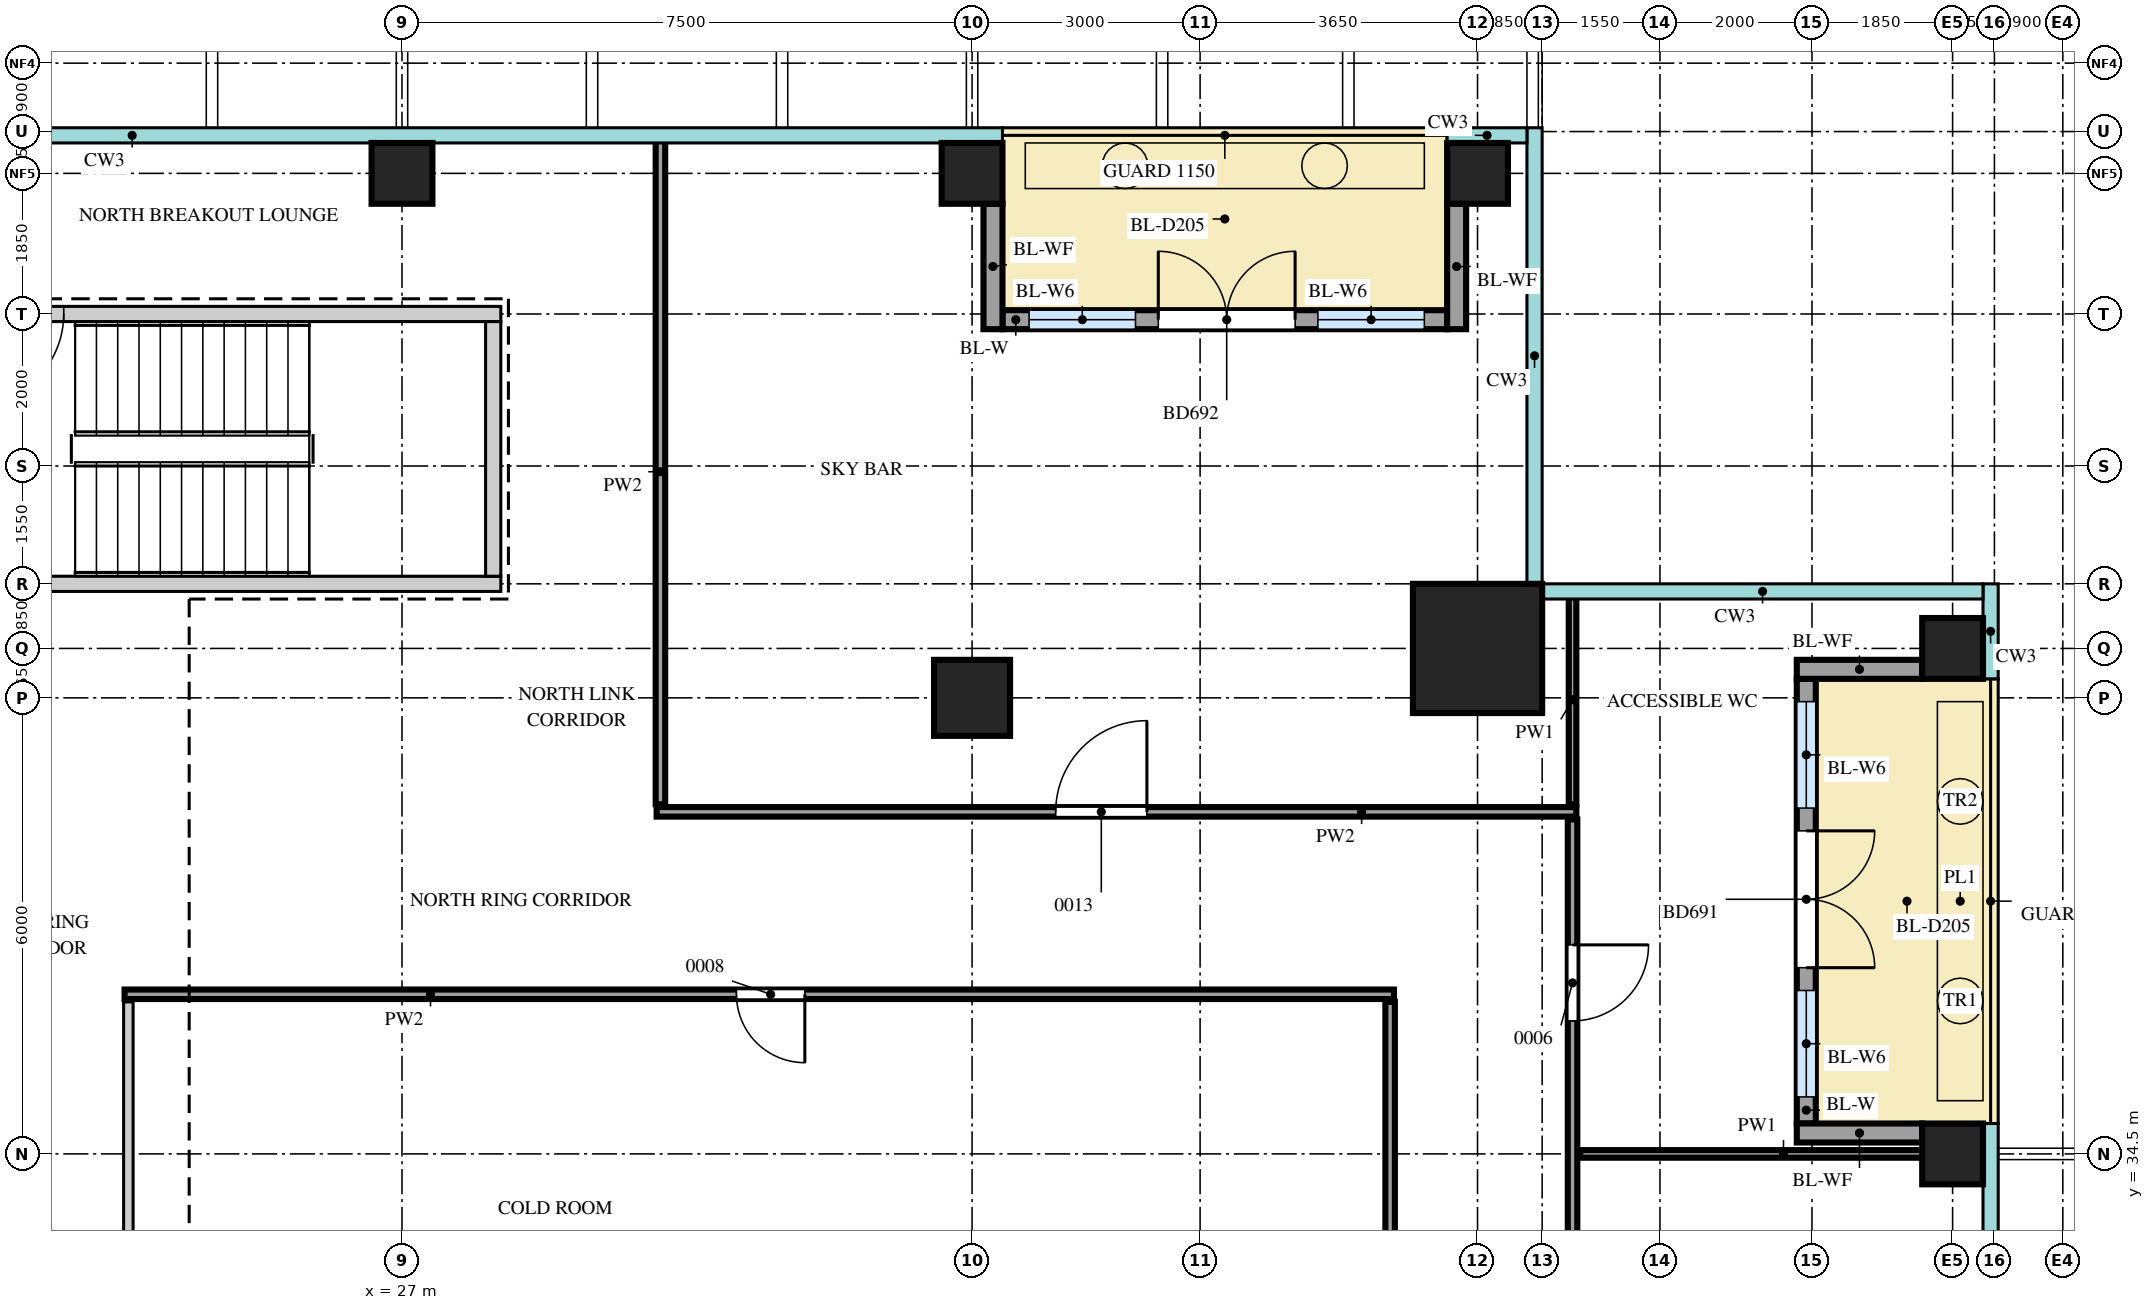
"""IFC4 building model, lengths in metres.
Left out: names, types, materials, properties, quantities, classifications, styles, units other than length and angle.
Written with IfcOpenShell. Run it as: python <this file> out.ifc"""

import sys

from ifc_helpers import new_model, si_unit, direction, frame, frame_2d, origin, origin_2d, place, context, subcontext, project, spatial, rectangle, extrude, source, transform, mapped, element, fill, save


model = new_model("IFC4")
c1 = context("Model", 3, precision=1e-05, world=origin(), true_north=direction((0.0, 1.0)))
c2 = subcontext(c1, "Body", "Model", "MODEL_VIEW")
j1 = project(units=[si_unit("LENGTHUNIT", "METRE"), si_unit("PLANEANGLEUNIT", "RADIAN")], contexts=[c1])
p1 = place(None, origin())
s1 = spatial("IfcSite", under=j1, at=p1, CompositionType="ELEMENT")
p2 = place(p1, origin())
s2 = spatial("IfcBuilding", under=s1, at=p2, CompositionType="ELEMENT")
p3 = place(p2, frame((0.0, 0.0, 306.2)))
s3 = spatial("IfcBuildingStorey", under=s2, at=p3, CompositionType="ELEMENT", Elevation=306.2)
m1 = source(origin(), c2, "Body", "SweptSolid", [
    extrude(rectangle(XDim=7.1, YDim=0.2, at=frame_2d((3.55, 0.0))), origin(), (0.0, 0.0, 1.0), 3.75),
])
p4 = place(p3, frame((21.2, 45.55, 0.0), z_axis=(0.0, 0.0, 1.0), x_axis=(1.0, 0.0, 0.0)))
e1 = element("IfcWall", 1, at=p4, inside=s3, PredefinedType="SHEAR", context=c2, shape_type="MappedRepresentation", body=[
    mapped(m1, transform((0.0, 0.0, 0.0))),
])
m2 = source(origin(), c2, "Body", "SweptSolid", [
    extrude(rectangle(XDim=1.2, YDim=2.1, at=frame_2d((0.6, 1.05))), frame((0.0, 0.11, 0.0), z_axis=(0.0, -1.0, 0.0), x_axis=(1.0, 0.0, 0.0)), (0.0, 0.0, 1.0), 0.22),
])
p5 = place(p4, frame((0.15, 0.0, 0.0)))
e2 = element("IfcOpeningElement", 2, at=p5, cuts=e1, PredefinedType="OPENING", context=c2, shape_type="MappedRepresentation", body=[
    mapped(m2, transform((0.0, 0.0, 0.0))),
])
p6 = place(p3, frame((21.2, 42.0, 0.0), z_axis=(0.0, 0.0, 1.0), x_axis=(1.0, 0.0, 0.0)))
e3 = element("IfcWall", 3, at=p6, inside=s3, PredefinedType="SHEAR", context=c2, shape_type="MappedRepresentation", body=[
    mapped(m1, transform((0.0, 0.0, 0.0))),
])
m3 = source(origin(), c2, "Body", "SweptSolid", [
    extrude(rectangle(XDim=3.35, YDim=0.2, at=frame_2d((1.675, 0.0))), origin(), (0.0, 0.0, 1.0), 3.75),
])
p7 = place(p3, frame((28.2, 42.1, 0.0), z_axis=(0.0, 0.0, 1.0), x_axis=(0.0, 1.0, 0.0)))
e4 = element("IfcWall", 4, at=p7, inside=s3, PredefinedType="SHEAR", context=c2, shape_type="MappedRepresentation", body=[
    mapped(m3, transform((0.0, 0.0, 0.0))),
])
m4 = source(origin(), c2, "Body", "SweptSolid", [
    extrude(rectangle(XDim=1.7, YDim=1.7, at=origin_2d()), origin(), (0.0, 0.0, 1.0), 3.75),
])
p8 = place(p3, frame((41.15, 41.15, 0.0), z_axis=(0.0, 0.0, 1.0), x_axis=(1.0, 0.0, 0.0)))
e5 = element("IfcColumn", 5, at=p8, inside=s3, PredefinedType="COLUMN", context=c2, shape_type="MappedRepresentation", body=[
    mapped(m4, transform((0.0, 0.0, 0.0))),
])
m5 = source(origin(), c2, "Body", "SweptSolid", [
    extrude(rectangle(XDim=0.8, YDim=0.8, at=origin_2d()), origin(), (0.0, 0.0, 1.0), 3.75),
])
for number, where, z_axis, x_axis in (
    (6, (47.4, 34.5, 0.0), (0.0, 0.0, 1.0), (1.0, 0.0, 0.0)),
    (7, (47.4, 41.15, 0.0), (0.0, 0.0, 1.0), (1.0, 0.0, 0.0)),
    (8, (27.0, 47.4, 0.0), (0.0, 0.0, 1.0), (1.0, 0.0, 0.0)),
    (9, (34.5, 47.4, 0.0), (0.0, 0.0, 1.0), (1.0, 0.0, 0.0)),
    (10, (41.15, 47.4, 0.0), (0.0, 0.0, 1.0), (1.0, 0.0, 0.0)),
):
    element("IfcColumn", number, at=place(p3, frame(where, z_axis=z_axis, x_axis=x_axis)), inside=s3, PredefinedType="COLUMN", context=c2, shape_type="MappedRepresentation", body=[
        mapped(m5, transform((0.0, 0.0, 0.0))),
    ])
m6 = source(origin(), c2, "Body", "SweptSolid", [
    extrude(rectangle(XDim=1.0, YDim=1.0, at=origin_2d()), origin(), (0.0, 0.0, 1.0), 3.75),
])
p9 = place(p3, frame((34.5, 40.5, 0.0), z_axis=(0.0, 0.0, 1.0), x_axis=(1.0, 0.0, 0.0)))
e11 = element("IfcColumn", 11, at=p9, inside=s3, PredefinedType="COLUMN", context=c2, shape_type="MappedRepresentation", body=[
    mapped(m6, transform((0.0, 0.0, 0.0))),
])
m7 = source(origin(), c2, "Body", "SweptSolid", [
    extrude(rectangle(XDim=5.85, YDim=0.25, at=frame_2d((2.925, 0.0))), origin(), (0.0, 0.0, 1.0), 3.75),
])
p10 = place(p3, frame((45.475, 34.9, 0.0), z_axis=(0.0, 0.0, 1.0), x_axis=(0.0, 1.0, 0.0)))
e12 = element("IfcWall", 12, at=p10, inside=s3, PredefinedType="SOLIDWALL", context=c2, shape_type="MappedRepresentation", body=[
    mapped(m7, transform((0.0, 0.0, 0.0))),
])
m8 = source(origin(), c2, "Body", "SweptSolid", [
    extrude(rectangle(XDim=1.4, YDim=2.4, at=frame_2d((0.7, 1.2))), frame((0.0, 0.135, 0.0), z_axis=(0.0, -1.0, 0.0), x_axis=(1.0, 0.0, 0.0)), (0.0, 0.0, 1.0), 0.27),
])
p11 = place(p10, frame((0.35, 0.0, 0.0)))
e13 = element("IfcOpeningElement", 13, at=p11, cuts=e12, PredefinedType="OPENING", context=c2, shape_type="MappedRepresentation", body=[
    mapped(m8, transform((0.0, 0.0, 0.0))),
])
p12 = place(p10, frame((4.15, 0.0, 0.0)))
e14 = element("IfcOpeningElement", 14, at=p12, cuts=e12, PredefinedType="OPENING", context=c2, shape_type="MappedRepresentation", body=[
    mapped(m8, transform((0.0, 0.0, 0.0))),
])
m9 = source(origin(), c2, "Body", "SweptSolid", [
    extrude(rectangle(XDim=1.8, YDim=2.4, at=frame_2d((0.9, 1.2))), frame((0.0, 0.135, 0.0), z_axis=(0.0, -1.0, 0.0), x_axis=(1.0, 0.0, 0.0)), (0.0, 0.0, 1.0), 0.27),
])
p13 = place(p10, frame((2.05, 0.0, 0.0)))
e15 = element("IfcOpeningElement", 15, at=p13, cuts=e12, PredefinedType="OPENING", context=c2, shape_type="MappedRepresentation", body=[
    mapped(m9, transform((0.0, 0.0, 0.0))),
])
m10 = source(origin(), c2, "Body", "SweptSolid", [
    extrude(rectangle(XDim=1.65, YDim=0.25, at=frame_2d((0.825, 0.0))), origin(), (0.0, 0.0, 1.0), 3.45),
])
for number, where, z_axis, x_axis in (
    (16, (47.0, 34.775, 0.0), (0.0, 0.0, 1.0), (-1.0, 0.0, 0.0)),
    (17, (47.0, 40.875, 0.0), (0.0, 0.0, 1.0), (-1.0, 0.0, 0.0)),
):
    element("IfcWall", number, at=place(p3, frame(where, z_axis=z_axis, x_axis=x_axis)), inside=s3, PredefinedType="SOLIDWALL", context=c2, shape_type="MappedRepresentation", body=[
        mapped(m10, transform((0.0, 0.0, 0.0))),
    ])
p14 = place(p3, frame((34.9, 45.475, 0.0), z_axis=(0.0, 0.0, 1.0), x_axis=(1.0, 0.0, 0.0)))
e18 = element("IfcWall", 18, at=p14, inside=s3, PredefinedType="SOLIDWALL", context=c2, shape_type="MappedRepresentation", body=[
    mapped(m7, transform((0.0, 0.0, 0.0))),
])
p15 = place(p14, frame((0.35, 0.0, 0.0)))
e19 = element("IfcOpeningElement", 19, at=p15, cuts=e18, PredefinedType="OPENING", context=c2, shape_type="MappedRepresentation", body=[
    mapped(m8, transform((0.0, 0.0, 0.0))),
])
p16 = place(p14, frame((4.15, 0.0, 0.0)))
e20 = element("IfcOpeningElement", 20, at=p16, cuts=e18, PredefinedType="OPENING", context=c2, shape_type="MappedRepresentation", body=[
    mapped(m8, transform((0.0, 0.0, 0.0))),
])
p17 = place(p14, frame((2.05, 0.0, 0.0)))
e21 = element("IfcOpeningElement", 21, at=p17, cuts=e18, PredefinedType="OPENING", context=c2, shape_type="MappedRepresentation", body=[
    mapped(m9, transform((0.0, 0.0, 0.0))),
])
for number, where, z_axis, x_axis in (
    (22, (34.775, 47.0, 0.0), (0.0, 0.0, 1.0), (0.0, -1.0, 0.0)),
    (23, (40.875, 47.0, 0.0), (0.0, 0.0, 1.0), (0.0, -1.0, 0.0)),
):
    element("IfcWall", number, at=place(p3, frame(where, z_axis=z_axis, x_axis=x_axis)), inside=s3, PredefinedType="SOLIDWALL", context=c2, shape_type="MappedRepresentation", body=[
        mapped(m10, transform((0.0, 0.0, 0.0))),
    ])
m11 = source(origin(), c2, "Body", "SweptSolid", [
    extrude(rectangle(XDim=23.8, YDim=0.125, at=frame_2d((11.9, 0.0))), origin(), (0.0, 0.0, 1.0), 3.8),
])
p18 = place(p3, frame((42.4, 15.1, 0.0), z_axis=(0.0, 0.0, 1.0), x_axis=(0.0, 1.0, 0.0)))
e24 = element("IfcWall", 24, at=p18, inside=s3, PredefinedType="PARTITIONING", context=c2, shape_type="MappedRepresentation", body=[
    mapped(m11, transform((0.0, 0.0, 0.0))),
])
m12 = source(origin(), c2, "Body", "SweptSolid", [
    extrude(rectangle(XDim=1.2, YDim=2.1, at=frame_2d((0.6, 1.05))), frame((0.0, 0.073, 0.0), z_axis=(0.0, -1.0, 0.0), x_axis=(1.0, 0.0, 0.0)), (0.0, 0.0, 1.0), 0.145),
])
p19 = place(p18, frame((1.55, 0.0, 0.0)))
e25 = element("IfcOpeningElement", 25, at=p19, cuts=e24, PredefinedType="OPENING", context=c2, shape_type="MappedRepresentation", body=[
    mapped(m12, transform((0.0, 0.0, 0.0))),
])
p20 = place(p18, frame((7.55, 0.0, 0.0)))
e26 = element("IfcOpeningElement", 26, at=p20, cuts=e24, PredefinedType="OPENING", context=c2, shape_type="MappedRepresentation", body=[
    mapped(m12, transform((0.0, 0.0, 0.0))),
])
m13 = source(origin(), c2, "Body", "SweptSolid", [
    extrude(rectangle(XDim=0.9, YDim=2.1, at=frame_2d((0.45, 1.05))), frame((0.0, 0.073, 0.0), z_axis=(0.0, -1.0, 0.0), x_axis=(1.0, 0.0, 0.0)), (0.0, 0.0, 1.0), 0.145),
])
p21 = place(p18, frame((13.3, 0.0, 0.0)))
e27 = element("IfcOpeningElement", 27, at=p21, cuts=e24, PredefinedType="OPENING", context=c2, shape_type="MappedRepresentation", body=[
    mapped(m13, transform((0.0, 0.0, 0.0))),
])
p22 = place(p18, frame((17.35, 0.0, 0.0)))
e28 = element("IfcOpeningElement", 28, at=p22, cuts=e24, PredefinedType="OPENING", context=c2, shape_type="MappedRepresentation", body=[
    mapped(m13, transform((0.0, 0.0, 0.0))),
])
m14 = source(origin(), c2, "Body", "SweptSolid", [
    extrude(rectangle(XDim=1.0, YDim=2.1, at=frame_2d((0.5, 1.05))), frame((0.0, 0.073, 0.0), z_axis=(0.0, -1.0, 0.0), x_axis=(1.0, 0.0, 0.0)), (0.0, 0.0, 1.0), 0.145),
])
p23 = place(p18, frame((21.15, 0.0, 0.0)))
e29 = element("IfcOpeningElement", 29, at=p23, cuts=e24, PredefinedType="OPENING", context=c2, shape_type="MappedRepresentation", body=[
    mapped(m14, transform((0.0, 0.0, 0.0))),
])
m15 = source(origin(), c2, "Body", "SweptSolid", [
    extrude(rectangle(XDim=19.0, YDim=0.125, at=frame_2d((9.5, 0.0))), origin(), (0.0, 0.0, 1.0), 3.8),
])
p24 = place(p3, frame((23.4, 17.5, 0.0), z_axis=(0.0, 0.0, 1.0), x_axis=(0.0, 1.0, 0.0)))
e30 = element("IfcWall", 30, at=p24, inside=s3, PredefinedType="PARTITIONING", context=c2, shape_type="MappedRepresentation", body=[
    mapped(m15, transform((0.0, 0.0, 0.0))),
])
p25 = place(p24, frame((10.4, 0.0, 0.0)))
e31 = element("IfcOpeningElement", 31, at=p25, cuts=e30, PredefinedType="OPENING", context=c2, shape_type="MappedRepresentation", body=[
    mapped(m13, transform((0.0, 0.0, 0.0))),
])
p26 = place(p3, frame((40.0, 17.5, 0.0), z_axis=(0.0, 0.0, 1.0), x_axis=(0.0, 1.0, 0.0)))
e32 = element("IfcWall", 32, at=p26, inside=s3, PredefinedType="PARTITIONING", context=c2, shape_type="MappedRepresentation", body=[
    mapped(m15, transform((0.0, 0.0, 0.0))),
])
m16 = source(origin(), c2, "Body", "SweptSolid", [
    extrude(rectangle(XDim=5.35, YDim=0.1, at=frame_2d((2.675, 0.0))), origin(), (0.0, 0.0, 1.0), 3.8),
])
p27 = place(p3, frame((42.5, 34.5, 0.0), z_axis=(0.0, 0.0, 1.0), x_axis=(1.0, 0.0, 0.0)))
e33 = element("IfcWall", 33, at=p27, inside=s3, PredefinedType="PARTITIONING", context=c2, shape_type="MappedRepresentation", body=[
    mapped(m16, transform((0.0, 0.0, 0.0))),
])
m17 = source(origin(), c2, "Body", "SweptSolid", [
    extrude(rectangle(XDim=16.7, YDim=0.125, at=frame_2d((8.35, 0.0))), origin(), (0.0, 0.0, 1.0), 3.8),
])
p28 = place(p3, frame((23.35, 36.6, 0.0), z_axis=(0.0, 0.0, 1.0), x_axis=(1.0, 0.0, 0.0)))
e34 = element("IfcWall", 34, at=p28, inside=s3, PredefinedType="PARTITIONING", context=c2, shape_type="MappedRepresentation", body=[
    mapped(m17, transform((0.0, 0.0, 0.0))),
])
p29 = place(p28, frame((8.05, 0.0, 0.0)))
e35 = element("IfcOpeningElement", 35, at=p29, cuts=e34, PredefinedType="OPENING", context=c2, shape_type="MappedRepresentation", body=[
    mapped(m13, transform((0.0, 0.0, 0.0))),
])
m18 = source(origin(), c2, "Body", "SweptSolid", [
    extrude(rectangle(XDim=12.1, YDim=0.125, at=frame_2d((6.05, 0.0))), origin(), (0.0, 0.0, 1.0), 3.8),
])
p30 = place(p3, frame((30.35, 39.0, 0.0), z_axis=(0.0, 0.0, 1.0), x_axis=(1.0, 0.0, 0.0)))
e36 = element("IfcWall", 36, at=p30, inside=s3, PredefinedType="PARTITIONING", context=c2, shape_type="MappedRepresentation", body=[
    mapped(m18, transform((0.0, 0.0, 0.0))),
])
p31 = place(p30, frame((5.25, 0.0, 0.0)))
e37 = element("IfcOpeningElement", 37, at=p31, cuts=e36, PredefinedType="OPENING", context=c2, shape_type="MappedRepresentation", body=[
    mapped(m12, transform((0.0, 0.0, 0.0))),
])
m19 = source(origin(), c2, "Body", "SweptSolid", [
    extrude(rectangle(XDim=8.75, YDim=0.125, at=frame_2d((4.375, 0.0))), origin(), (0.0, 0.0, 1.0), 3.8),
])
p32 = place(p3, frame((30.4, 39.1, 0.0), z_axis=(0.0, 0.0, 1.0), x_axis=(0.0, 1.0, 0.0)))
e38 = element("IfcWall", 38, at=p32, inside=s3, PredefinedType="PARTITIONING", context=c2, shape_type="MappedRepresentation", body=[
    mapped(m19, transform((0.0, 0.0, 0.0))),
])
m20 = source(origin(), c2, "Body", "SweptSolid", [
    extrude(rectangle(XDim=2.75, YDim=0.1, at=frame_2d((1.375, 0.0))), origin(), (0.0, 0.0, 1.0), 3.8),
])
p33 = place(p3, frame((42.4, 39.1, 0.0), z_axis=(0.0, 0.0, 1.0), x_axis=(0.0, 1.0, 0.0)))
e39 = element("IfcWall", 39, at=p33, inside=s3, PredefinedType="PARTITIONING", context=c2, shape_type="MappedRepresentation", body=[
    mapped(m20, transform((0.0, 0.0, 0.0))),
])
m21 = source(origin(), c2, "Body", "SweptSolid", [
    extrude(rectangle(XDim=1.4, YDim=2.4, at=frame_2d((0.7, 1.2))), frame((0.0, 0.03, 0.0), z_axis=(0.0, -1.0, 0.0), x_axis=(1.0, 0.0, 0.0)), (0.0, 0.0, 1.0), 0.06),
])
p34 = place(p11, origin())
e40 = element("IfcWindow", 40, at=p34, inside=s3, PartitioningType="SINGLE_PANEL", PredefinedType="WINDOW", context=c2, shape_type="MappedRepresentation", body=[
    mapped(m21, transform((0.0, 0.0, 0.0))),
])
fill(e13, e40)
p35 = place(p12, origin())
e41 = element("IfcWindow", 41, at=p35, inside=s3, PartitioningType="SINGLE_PANEL", PredefinedType="WINDOW", context=c2, shape_type="MappedRepresentation", body=[
    mapped(m21, transform((0.0, 0.0, 0.0))),
])
fill(e14, e41)
m22 = source(origin(), c2, "Body", "SweptSolid", [
    extrude(rectangle(XDim=1.8, YDim=2.4, at=frame_2d((0.9, 1.2))), frame((0.0, 0.025, 0.0), z_axis=(0.0, -1.0, 0.0), x_axis=(1.0, 0.0, 0.0)), (0.0, 0.0, 1.0), 0.05),
])
p36 = place(p13, origin())
e42 = element("IfcDoor", 42, at=p36, inside=s3, OperationType="DOUBLE_DOOR_DOUBLE_SWING", PredefinedType="DOOR", context=c2, shape_type="MappedRepresentation", body=[
    mapped(m22, transform((0.0, 0.0, 0.0))),
])
fill(e15, e42)
p37 = place(p15, origin())
e43 = element("IfcWindow", 43, at=p37, inside=s3, PartitioningType="SINGLE_PANEL", PredefinedType="WINDOW", context=c2, shape_type="MappedRepresentation", body=[
    mapped(m21, transform((0.0, 0.0, 0.0))),
])
fill(e19, e43)
p38 = place(p16, origin())
e44 = element("IfcWindow", 44, at=p38, inside=s3, PartitioningType="SINGLE_PANEL", PredefinedType="WINDOW", context=c2, shape_type="MappedRepresentation", body=[
    mapped(m21, transform((0.0, 0.0, 0.0))),
])
fill(e20, e44)
p39 = place(p17, origin())
e45 = element("IfcDoor", 45, at=p39, inside=s3, OperationType="DOUBLE_DOOR_DOUBLE_SWING", PredefinedType="DOOR", context=c2, shape_type="MappedRepresentation", body=[
    mapped(m22, transform((0.0, 0.0, 0.0))),
])
fill(e21, e45)
m23 = source(origin(), c2, "Body", "SweptSolid", [
    extrude(rectangle(XDim=1.0, YDim=2.1, at=frame_2d((0.5, 1.05))), frame((0.0, 0.025, 0.0), z_axis=(0.0, -1.0, 0.0), x_axis=(1.0, 0.0, 0.0)), (0.0, 0.0, 1.0), 0.05),
])
p40 = place(p23, origin())
e46 = element("IfcDoor", 46, at=p40, inside=s3, OperationType="SINGLE_SWING_RIGHT", PredefinedType="DOOR", context=c2, shape_type="MappedRepresentation", body=[
    mapped(m23, transform((0.0, 0.0, 0.0))),
])
fill(e29, e46)
m24 = source(origin(), c2, "Body", "SweptSolid", [
    extrude(rectangle(XDim=1.2, YDim=2.1, at=frame_2d((0.6, 1.05))), frame((0.0, 0.025, 0.0), z_axis=(0.0, -1.0, 0.0), x_axis=(1.0, 0.0, 0.0)), (0.0, 0.0, 1.0), 0.05),
])
p41 = place(p31, origin())
e47 = element("IfcDoor", 47, at=p41, inside=s3, OperationType="SINGLE_SWING_LEFT", PredefinedType="DOOR", context=c2, shape_type="MappedRepresentation", body=[
    mapped(m24, transform((0.0, 0.0, 0.0))),
])
fill(e37, e47)
m25 = source(origin(), c2, "Body", "SweptSolid", [
    extrude(rectangle(XDim=0.9, YDim=2.1, at=frame_2d((0.45, 1.05))), frame((0.0, 0.025, 0.0), z_axis=(0.0, -1.0, 0.0), x_axis=(1.0, 0.0, 0.0)), (0.0, 0.0, 1.0), 0.05),
])
p42 = place(p29, origin())
e48 = element("IfcDoor", 48, at=p42, inside=s3, OperationType="SINGLE_SWING_RIGHT", PredefinedType="DOOR", context=c2, shape_type="MappedRepresentation", body=[
    mapped(m25, transform((0.0, 0.0, 0.0))),
])
fill(e35, e48)
p43 = place(p5, origin())
e49 = element("IfcDoor", 49, at=p43, inside=s3, OperationType="SINGLE_SWING_LEFT", PredefinedType="DOOR", context=c2, shape_type="MappedRepresentation", body=[
    mapped(m24, transform((0.0, 0.0, 0.0))),
])
fill(e2, e49)
save(model, sys.argv[1])
